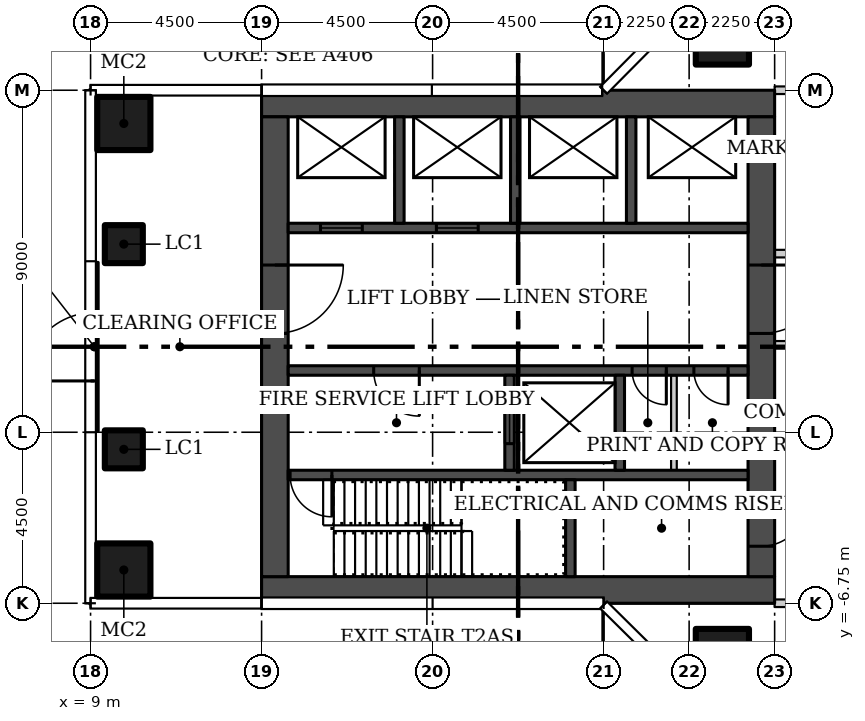
"""IFC4 building model, lengths in metres.
Left out: names, types, materials, properties, quantities, classifications, styles, units other than length and angle.
Written with IfcOpenShell. Run it as: python <this file> out.ifc"""

import sys

from ifc_helpers import new_model, si_unit, direction, frame, frame_2d, origin, origin_2d, place, context, subcontext, project, spatial, rectangle, hollow_rectangle, extrude, element, fill, save


model = new_model("IFC4")
c1 = context("Model", 3, precision=1e-05, world=origin(), true_north=direction((0.0, 1.0)))
c2 = subcontext(c1, "Body", "Model", "MODEL_VIEW")
j1 = project(units=[si_unit("LENGTHUNIT", "METRE"), si_unit("PLANEANGLEUNIT", "RADIAN")], contexts=[c1])
p1 = place(None, origin())
s1 = spatial("IfcSite", under=j1, at=p1, CompositionType="ELEMENT")
p2 = place(p1, origin())
s2 = spatial("IfcBuilding", under=s1, at=p2, CompositionType="ELEMENT")
p3 = place(p2, frame((0.0, 0.0, 28.5)))
s3 = spatial("IfcBuildingStorey", under=s2, at=p3, CompositionType="ELEMENT", Elevation=28.5)
for number, where in (
    (1, (25.625, 8.125, 0.0)),
    (2, (25.625, -8.125, 0.0)),
    (3, (9.875, -5.875, 0.0)),
    (4, (9.875, 5.875, 0.0)),
):
    element("IfcColumn", number, at=place(p3, frame(where)), inside=s3, PredefinedType="COLUMN", context=c2, shape_type="SweptSolid", body=[
        extrude(hollow_rectangle(XDim=1.4, YDim=1.4, WallThickness=0.05, at=origin_2d()), origin(), (0.0, 0.0, 1.0), 4.15),
    ])
for number, where in (
    (5, (9.875, -2.7, 0.0)),
    (6, (9.875, 2.7, 0.0)),
):
    element("IfcColumn", number, at=place(p3, frame(where)), inside=s3, PredefinedType="COLUMN", context=c2, shape_type="SweptSolid", body=[
        extrude(hollow_rectangle(XDim=1.0, YDim=1.0, WallThickness=0.04, at=origin_2d()), origin(), (0.0, 0.0, 1.0), 4.15),
    ])
p4 = place(p3, frame((32.95, 6.75, 0.0), z_axis=(0.0, 0.0, 1.0), x_axis=(-1.0, 0.0, 0.0)))
e7 = element("IfcWall", 7, at=p4, inside=s3, PredefinedType="PARTITIONING", context=c2, shape_type="SweptSolid", body=[
    extrude(rectangle(XDim=5.95, YDim=0.2, at=frame_2d((2.975, 0.0))), origin(), (0.0, 0.0, 1.0), 4.15),
])
p5 = place(p3, frame((27.0, 2.45, 0.0)))
e8 = element("IfcWall", 8, at=p5, inside=s3, PredefinedType="PARTITIONING", context=c2, shape_type="SweptSolid", body=[
    extrude(rectangle(XDim=5.95, YDim=0.2, at=frame_2d((2.975, 0.0))), origin(), (0.0, 0.0, 1.0), 4.15),
])
p6 = place(p3, frame((32.95, 0.05, 0.0), z_axis=(0.0, 0.0, 1.0), x_axis=(-1.0, 0.0, 0.0)))
e9 = element("IfcWall", 9, at=p6, inside=s3, PredefinedType="PARTITIONING", context=c2, shape_type="SweptSolid", body=[
    extrude(rectangle(XDim=5.95, YDim=0.2, at=frame_2d((2.975, 0.0))), origin(), (0.0, 0.0, 1.0), 4.15),
])
p7 = place(p3, frame((27.0, -6.75, 0.0)))
e10 = element("IfcWall", 10, at=p7, inside=s3, PredefinedType="PARTITIONING", context=c2, shape_type="SweptSolid", body=[
    extrude(rectangle(XDim=5.95, YDim=0.2, at=frame_2d((2.975, 0.0))), origin(), (0.0, 0.0, 1.0), 4.15),
])
p8 = place(p3, frame((9.1, -2.22, 0.0), z_axis=(0.0, 0.0, 1.0), x_axis=(0.0, 1.0, 0.0)))
e11 = element("IfcWall", 11, at=p8, inside=s3, PredefinedType="SOLIDWALL", context=c2, shape_type="SweptSolid", body=[
    extrude(rectangle(XDim=4.44, YDim=0.2, at=frame_2d((2.22, 0.0))), origin(), (0.0, 0.0, 1.0), 3.0),
])
p9 = place(p8, frame((1.32, 0.0, 0.0)))
e12 = element("IfcOpeningElement", 12, at=p9, cuts=e11, PredefinedType="OPENING", context=c2, shape_type="SweptSolid", body=[
    extrude(rectangle(XDim=1.8, YDim=2.4, at=frame_2d((0.9, 1.2))), frame((0.0, 0.11, 0.0), z_axis=(0.0, -1.0, 0.0), x_axis=(1.0, 0.0, 0.0)), (0.0, 0.0, 1.0), 0.22),
])
for number, where in (
    (13, (13.5, -6.4, 0.0)),
    (14, (13.5, 6.4, 0.0)),
):
    element("IfcWall", number, at=place(p3, frame(where)), inside=s3, PredefinedType="SHEAR", context=c2, shape_type="SweptSolid", body=[
        extrude(rectangle(XDim=13.5, YDim=0.7, at=frame_2d((6.75, 0.0))), origin(), (0.0, 0.0, 1.0), 4.15),
    ])
p10 = place(p3, frame((13.85, 6.05, 0.0), z_axis=(0.0, 0.0, 1.0), x_axis=(0.0, -1.0, 0.0)))
e15 = element("IfcWall", 15, at=p10, inside=s3, PredefinedType="SHEAR", context=c2, shape_type="SweptSolid", body=[
    extrude(rectangle(XDim=12.1, YDim=0.7, at=frame_2d((6.05, 0.0))), origin(), (0.0, 0.0, 1.0), 4.15),
])
p11 = place(p10, frame((3.9, 0.0, 0.0)))
e16 = element("IfcOpeningElement", 16, at=p11, cuts=e15, PredefinedType="OPENING", context=c2, shape_type="SweptSolid", body=[
    extrude(rectangle(XDim=1.8, YDim=2.4, at=frame_2d((0.9, 1.2))), frame((0.0, 0.36, 0.0), z_axis=(0.0, -1.0, 0.0), x_axis=(1.0, 0.0, 0.0)), (0.0, 0.0, 1.0), 0.72),
])
p12 = place(p3, frame((26.65, 6.05, 0.0), z_axis=(0.0, 0.0, 1.0), x_axis=(0.0, -1.0, 0.0)))
e17 = element("IfcWall", 17, at=p12, inside=s3, PredefinedType="SHEAR", context=c2, shape_type="SweptSolid", body=[
    extrude(rectangle(XDim=12.1, YDim=0.7, at=frame_2d((6.05, 0.0))), origin(), (0.0, 0.0, 1.0), 4.15),
])
p13 = place(p12, frame((10.1, 0.0, 0.0)))
e18 = element("IfcOpeningElement", 18, at=p13, cuts=e17, PredefinedType="OPENING", context=c2, shape_type="SweptSolid", body=[
    extrude(rectangle(XDim=1.2, YDim=2.1, at=frame_2d((0.6, 1.05))), frame((0.0, 0.36, 0.0), z_axis=(0.0, -1.0, 0.0), x_axis=(1.0, 0.0, 0.0)), (0.0, 0.0, 1.0), 0.72),
])
p14 = place(p12, frame((3.9, 0.0, 0.0)))
e19 = element("IfcOpeningElement", 19, at=p14, cuts=e17, PredefinedType="OPENING", context=c2, shape_type="SweptSolid", body=[
    extrude(rectangle(XDim=1.8, YDim=2.4, at=frame_2d((0.9, 1.2))), frame((0.0, 0.36, 0.0), z_axis=(0.0, -1.0, 0.0), x_axis=(1.0, 0.0, 0.0)), (0.0, 0.0, 1.0), 0.72),
])
p15 = place(p3, frame((26.3, -3.375, 0.0), z_axis=(0.0, 0.0, 1.0), x_axis=(-1.0, 0.0, 0.0)))
e20 = element("IfcWall", 20, at=p15, inside=s3, PredefinedType="SHEAR", context=c2, shape_type="SweptSolid", body=[
    extrude(rectangle(XDim=12.1, YDim=0.25, at=frame_2d((6.05, 0.0))), origin(), (0.0, 0.0, 1.0), 4.15),
])
p16 = place(p15, frame((10.95, 0.0, 0.0)))
e21 = element("IfcOpeningElement", 21, at=p16, cuts=e20, PredefinedType="OPENING", context=c2, shape_type="SweptSolid", body=[
    extrude(rectangle(XDim=1.1, YDim=2.1, at=frame_2d((0.55, 1.05))), frame((0.0, 0.135, 0.0), z_axis=(0.0, -1.0, 0.0), x_axis=(1.0, 0.0, 0.0)), (0.0, 0.0, 1.0), 0.27),
])
p17 = place(p3, frame((21.625, -6.05, 0.0), z_axis=(0.0, 0.0, 1.0), x_axis=(0.0, 1.0, 0.0)))
e22 = element("IfcWall", 22, at=p17, inside=s3, PredefinedType="SHEAR", context=c2, shape_type="SweptSolid", body=[
    extrude(rectangle(XDim=2.55, YDim=0.25, at=frame_2d((1.275, 0.0))), origin(), (0.0, 0.0, 1.0), 4.15),
])
p18 = place(p3, frame((26.3, -0.625, 0.0), z_axis=(0.0, 0.0, 1.0), x_axis=(-1.0, 0.0, 0.0)))
e23 = element("IfcWall", 23, at=p18, inside=s3, PredefinedType="SHEAR", context=c2, shape_type="SweptSolid", body=[
    extrude(rectangle(XDim=12.1, YDim=0.25, at=frame_2d((6.05, 0.0))), origin(), (0.0, 0.0, 1.0), 4.15),
])
p19 = place(p18, frame((8.65, 0.0, 0.0)))
e24 = element("IfcOpeningElement", 24, at=p19, cuts=e23, PredefinedType="OPENING", context=c2, shape_type="SweptSolid", body=[
    extrude(rectangle(XDim=1.2, YDim=2.1, at=frame_2d((0.6, 1.05))), frame((0.0, 0.135, 0.0), z_axis=(0.0, -1.0, 0.0), x_axis=(1.0, 0.0, 0.0)), (0.0, 0.0, 1.0), 0.27),
])
p20 = place(p18, frame((2.15, 0.0, 0.0)))
e25 = element("IfcOpeningElement", 25, at=p20, cuts=e23, PredefinedType="OPENING", context=c2, shape_type="SweptSolid", body=[
    extrude(rectangle(XDim=0.9, YDim=2.1, at=frame_2d((0.45, 1.05))), frame((0.0, 0.135, 0.0), z_axis=(0.0, -1.0, 0.0), x_axis=(1.0, 0.0, 0.0)), (0.0, 0.0, 1.0), 0.27),
])
p21 = place(p18, frame((0.525, 0.0, 0.0)))
e26 = element("IfcOpeningElement", 26, at=p21, cuts=e23, PredefinedType="OPENING", context=c2, shape_type="SweptSolid", body=[
    extrude(rectangle(XDim=0.9, YDim=2.1, at=frame_2d((0.45, 1.05))), frame((0.0, 0.135, 0.0), z_axis=(0.0, -1.0, 0.0), x_axis=(1.0, 0.0, 0.0)), (0.0, 0.0, 1.0), 0.27),
])
p22 = place(p3, frame((20.025, -3.25, 0.0), z_axis=(0.0, 0.0, 1.0), x_axis=(0.0, 1.0, 0.0)))
e27 = element("IfcWall", 27, at=p22, inside=s3, PredefinedType="SHEAR", context=c2, shape_type="SweptSolid", body=[
    extrude(rectangle(XDim=2.5, YDim=0.25, at=frame_2d((1.25, 0.0))), origin(), (0.0, 0.0, 1.0), 4.15),
])
p23 = place(p22, frame((0.7, 0.0, 0.0)))
e28 = element("IfcOpeningElement", 28, at=p23, cuts=e27, PredefinedType="OPENING", context=c2, shape_type="SweptSolid", body=[
    extrude(rectangle(XDim=1.1, YDim=2.1, at=frame_2d((0.55, 1.05))), frame((0.0, 0.135, 0.0), z_axis=(0.0, -1.0, 0.0), x_axis=(1.0, 0.0, 0.0)), (0.0, 0.0, 1.0), 0.27),
])
p24 = place(p3, frame((22.925, -3.25, 0.0), z_axis=(0.0, 0.0, 1.0), x_axis=(0.0, 1.0, 0.0)))
e29 = element("IfcWall", 29, at=p24, inside=s3, PredefinedType="SHEAR", context=c2, shape_type="SweptSolid", body=[
    extrude(rectangle(XDim=2.5, YDim=0.25, at=frame_2d((1.25, 0.0))), origin(), (0.0, 0.0, 1.0), 4.15),
])
p25 = place(p3, frame((24.35, -3.25, 0.0), z_axis=(0.0, 0.0, 1.0), x_axis=(0.0, 1.0, 0.0)))
e30 = element("IfcWall", 30, at=p25, inside=s3, PredefinedType="PARTITIONING", context=c2, shape_type="SweptSolid", body=[
    extrude(rectangle(XDim=2.5, YDim=0.15, at=frame_2d((1.25, 0.0))), origin(), (0.0, 0.0, 1.0), 4.15),
])
p26 = place(p3, frame((14.2, 3.125, 0.0)))
e31 = element("IfcWall", 31, at=p26, inside=s3, PredefinedType="SHEAR", context=c2, shape_type="SweptSolid", body=[
    extrude(rectangle(XDim=12.1, YDim=0.25, at=frame_2d((6.05, 0.0))), origin(), (0.0, 0.0, 1.0), 4.15),
])
p27 = place(p26, frame((0.85, 0.0, 0.0)))
e32 = element("IfcOpeningElement", 32, at=p27, cuts=e31, PredefinedType="OPENING", context=c2, shape_type="SweptSolid", body=[
    extrude(rectangle(XDim=1.1, YDim=2.1, at=frame_2d((0.55, 1.05))), frame((0.0, 0.135, 0.0), z_axis=(0.0, -1.0, 0.0), x_axis=(1.0, 0.0, 0.0)), (0.0, 0.0, 1.0), 0.27),
])
p28 = place(p26, frame((3.9, 0.0, 0.0)))
e33 = element("IfcOpeningElement", 33, at=p28, cuts=e31, PredefinedType="OPENING", context=c2, shape_type="SweptSolid", body=[
    extrude(rectangle(XDim=1.1, YDim=2.1, at=frame_2d((0.55, 1.05))), frame((0.0, 0.135, 0.0), z_axis=(0.0, -1.0, 0.0), x_axis=(1.0, 0.0, 0.0)), (0.0, 0.0, 1.0), 0.27),
])
for number, where, z_axis, x_axis in (
    (34, (17.125, 3.25, 0.0), (0.0, 0.0, 1.0), (0.0, 1.0, 0.0)),
    (35, (20.175, 3.25, 0.0), (0.0, 0.0, 1.0), (0.0, 1.0, 0.0)),
    (36, (23.225, 3.25, 0.0), (0.0, 0.0, 1.0), (0.0, 1.0, 0.0)),
):
    element("IfcWall", number, at=place(p3, frame(where, z_axis=z_axis, x_axis=x_axis)), inside=s3, PredefinedType="SHEAR", context=c2, shape_type="SweptSolid", body=[
        extrude(rectangle(XDim=2.8, YDim=0.25, at=frame_2d((1.4, 0.0))), origin(), (0.0, 0.0, 1.0), 4.15),
    ])
p29 = place(p9, origin())
e37 = element("IfcDoor", 37, at=p29, inside=s3, OperationType="DOUBLE_DOOR_SINGLE_SWING", PredefinedType="DOOR", context=c2, shape_type="SweptSolid", body=[
    extrude(rectangle(XDim=1.8, YDim=2.4, at=frame_2d((0.9, 1.2))), frame((0.0, 0.025, 0.0), z_axis=(0.0, -1.0, 0.0), x_axis=(1.0, 0.0, 0.0)), (0.0, 0.0, 1.0), 0.05),
])
fill(e12, e37)
p30 = place(p11, origin())
e38 = element("IfcDoor", 38, at=p30, inside=s3, OperationType="DOUBLE_DOOR_SINGLE_SWING", PredefinedType="DOOR", context=c2, shape_type="SweptSolid", body=[
    extrude(rectangle(XDim=1.8, YDim=2.4, at=frame_2d((0.9, 1.2))), frame((0.0, 0.025, 0.0), z_axis=(0.0, -1.0, 0.0), x_axis=(1.0, 0.0, 0.0)), (0.0, 0.0, 1.0), 0.05),
])
fill(e16, e38)
p31 = place(p13, origin())
e39 = element("IfcDoor", 39, at=p31, inside=s3, OperationType="SINGLE_SWING_RIGHT", PredefinedType="DOOR", context=c2, shape_type="SweptSolid", body=[
    extrude(rectangle(XDim=1.2, YDim=2.1, at=frame_2d((0.6, 1.05))), frame((0.0, 0.025, 0.0), z_axis=(0.0, -1.0, 0.0), x_axis=(1.0, 0.0, 0.0)), (0.0, 0.0, 1.0), 0.05),
])
fill(e18, e39)
p32 = place(p14, origin())
e40 = element("IfcDoor", 40, at=p32, inside=s3, OperationType="DOUBLE_DOOR_SINGLE_SWING", PredefinedType="DOOR", context=c2, shape_type="SweptSolid", body=[
    extrude(rectangle(XDim=1.8, YDim=2.4, at=frame_2d((0.9, 1.2))), frame((0.0, 0.025, 0.0), z_axis=(0.0, -1.0, 0.0), x_axis=(1.0, 0.0, 0.0)), (0.0, 0.0, 1.0), 0.05),
])
fill(e19, e40)
p33 = place(p16, origin())
e41 = element("IfcDoor", 41, at=p33, inside=s3, OperationType="SINGLE_SWING_RIGHT", PredefinedType="DOOR", context=c2, shape_type="SweptSolid", body=[
    extrude(rectangle(XDim=1.1, YDim=2.1, at=frame_2d((0.55, 1.05))), frame((0.0, 0.025, 0.0), z_axis=(0.0, -1.0, 0.0), x_axis=(1.0, 0.0, 0.0)), (0.0, 0.0, 1.0), 0.05),
])
fill(e21, e41)
p34 = place(p19, origin())
e42 = element("IfcDoor", 42, at=p34, inside=s3, OperationType="SINGLE_SWING_RIGHT", PredefinedType="DOOR", context=c2, shape_type="SweptSolid", body=[
    extrude(rectangle(XDim=1.2, YDim=2.1, at=frame_2d((0.6, 1.05))), frame((0.0, 0.025, 0.0), z_axis=(0.0, -1.0, 0.0), x_axis=(1.0, 0.0, 0.0)), (0.0, 0.0, 1.0), 0.05),
])
fill(e24, e42)
p35 = place(p20, origin())
e43 = element("IfcDoor", 43, at=p35, inside=s3, OperationType="SINGLE_SWING_LEFT", PredefinedType="DOOR", context=c2, shape_type="SweptSolid", body=[
    extrude(rectangle(XDim=0.9, YDim=2.1, at=frame_2d((0.45, 1.05))), frame((0.0, 0.025, 0.0), z_axis=(0.0, -1.0, 0.0), x_axis=(1.0, 0.0, 0.0)), (0.0, 0.0, 1.0), 0.05),
])
fill(e25, e43)
p36 = place(p21, origin())
e44 = element("IfcDoor", 44, at=p36, inside=s3, OperationType="SINGLE_SWING_LEFT", PredefinedType="DOOR", context=c2, shape_type="SweptSolid", body=[
    extrude(rectangle(XDim=0.9, YDim=2.1, at=frame_2d((0.45, 1.05))), frame((0.0, 0.025, 0.0), z_axis=(0.0, -1.0, 0.0), x_axis=(1.0, 0.0, 0.0)), (0.0, 0.0, 1.0), 0.05),
])
fill(e26, e44)
p37 = place(p23, origin())
e45 = element("IfcDoor", 45, at=p37, inside=s3, OperationType="SLIDING_TO_LEFT", PredefinedType="DOOR", context=c2, shape_type="SweptSolid", body=[
    extrude(rectangle(XDim=1.1, YDim=2.1, at=frame_2d((0.55, 1.05))), frame((0.0, 0.025, 0.0), z_axis=(0.0, -1.0, 0.0), x_axis=(1.0, 0.0, 0.0)), (0.0, 0.0, 1.0), 0.05),
])
fill(e28, e45)
p38 = place(p27, origin())
e46 = element("IfcDoor", 46, at=p38, inside=s3, OperationType="SLIDING_TO_LEFT", PredefinedType="DOOR", context=c2, shape_type="SweptSolid", body=[
    extrude(rectangle(XDim=1.1, YDim=2.1, at=frame_2d((0.55, 1.05))), frame((0.0, 0.025, 0.0), z_axis=(0.0, -1.0, 0.0), x_axis=(1.0, 0.0, 0.0)), (0.0, 0.0, 1.0), 0.05),
])
fill(e32, e46)
p39 = place(p28, origin())
e47 = element("IfcDoor", 47, at=p39, inside=s3, OperationType="SLIDING_TO_LEFT", PredefinedType="DOOR", context=c2, shape_type="SweptSolid", body=[
    extrude(rectangle(XDim=1.1, YDim=2.1, at=frame_2d((0.55, 1.05))), frame((0.0, 0.025, 0.0), z_axis=(0.0, -1.0, 0.0), x_axis=(1.0, 0.0, 0.0)), (0.0, 0.0, 1.0), 0.05),
])
fill(e33, e47)
save(model, sys.argv[1])
